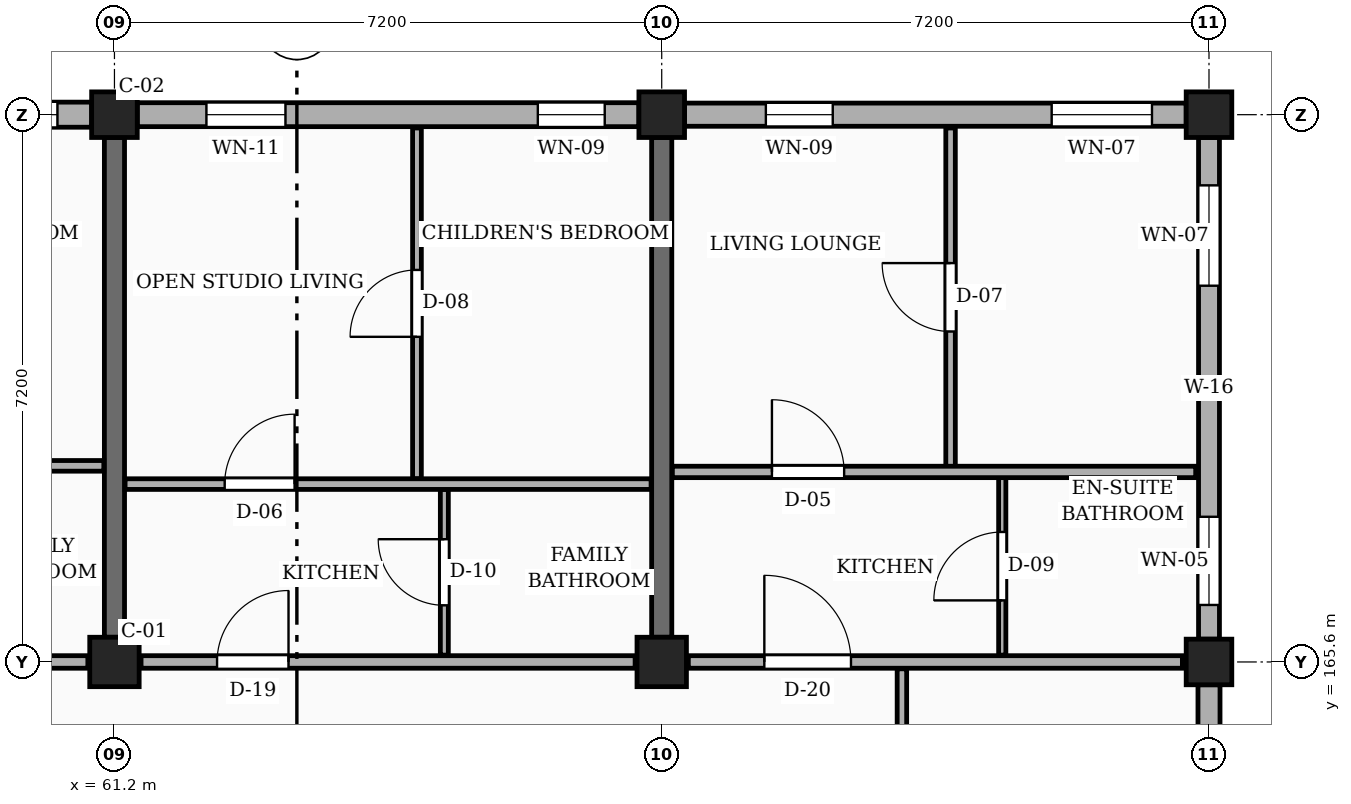
"""IFC4 building model, lengths in metres.
Left out: names, types, materials, properties, quantities, classifications, styles, units other than length and angle.
Written with IfcOpenShell. Run it as: python <this file> out.ifc"""

import sys

from ifc_helpers import new_model, si_unit, direction, frame, frame_2d, origin, origin_2d, place, context, subcontext, project, spatial, rectangle, extrude, element, fill, save


model = new_model("IFC4")
c1 = context("Model", 3, precision=1e-05, world=origin(), true_north=direction((0.0, 1.0)))
c2 = subcontext(c1, "Body", "Model", "MODEL_VIEW")
j1 = project(units=[si_unit("LENGTHUNIT", "METRE"), si_unit("PLANEANGLEUNIT", "RADIAN")], contexts=[c1])
p1 = place(None, origin())
s1 = spatial("IfcSite", under=j1, at=p1, CompositionType="ELEMENT")
p2 = place(p1, origin())
s2 = spatial("IfcBuilding", under=s1, at=p2, CompositionType="ELEMENT")
p3 = place(p2, frame((0.0, 0.0, 4.5)))
s3 = spatial("IfcBuildingStorey", under=s2, at=p3, CompositionType="ELEMENT", Elevation=4.5)
p4 = place(p3, frame((61.2, 165.6, 0.0), z_axis=(0.0, 0.0, 1.0), x_axis=(1.0, 0.0, 0.0)))
e1 = element("IfcColumn", 1, at=p4, inside=s3, PredefinedType="COLUMN", context=c2, shape_type="SweptSolid", body=[
    extrude(rectangle(XDim=0.65, YDim=0.65, at=origin_2d()), origin(), (0.0, 0.0, 1.0), 3.15),
])
p5 = place(p3, frame((61.2, 172.8, 0.0), z_axis=(0.0, 0.0, 1.0), x_axis=(1.0, 0.0, 0.0)))
e2 = element("IfcColumn", 2, at=p5, inside=s3, PredefinedType="COLUMN", context=c2, shape_type="SweptSolid", body=[
    extrude(rectangle(XDim=0.6, YDim=0.6, at=origin_2d()), origin(), (0.0, 0.0, 1.0), 3.15),
])
p6 = place(p3, frame((68.4, 165.6, 0.0), z_axis=(0.0, 0.0, 1.0), x_axis=(1.0, 0.0, 0.0)))
e3 = element("IfcColumn", 3, at=p6, inside=s3, PredefinedType="COLUMN", context=c2, shape_type="SweptSolid", body=[
    extrude(rectangle(XDim=0.65, YDim=0.65, at=origin_2d()), origin(), (0.0, 0.0, 1.0), 3.15),
])
for number, where, z_axis, x_axis in (
    (4, (68.4, 172.8, 0.0), (0.0, 0.0, 1.0), (1.0, 0.0, 0.0)),
    (5, (75.6, 165.6, 0.0), (0.0, 0.0, 1.0), (1.0, 0.0, 0.0)),
    (6, (75.6, 172.8, 0.0), (0.0, 0.0, 1.0), (1.0, 0.0, 0.0)),
):
    element("IfcColumn", number, at=place(p3, frame(where, z_axis=z_axis, x_axis=x_axis)), inside=s3, PredefinedType="COLUMN", context=c2, shape_type="SweptSolid", body=[
        extrude(rectangle(XDim=0.6, YDim=0.6, at=origin_2d()), origin(), (0.0, 0.0, 1.0), 3.15),
    ])
for number, where, z_axis, x_axis in (
    (7, (61.2, 165.925, 0.0), (0.0, 0.0, 1.0), (0.0, 1.0, 0.0)),
    (8, (68.4, 165.925, 0.0), (0.0, 0.0, 1.0), (0.0, 1.0, 0.0)),
):
    element("IfcWall", number, at=place(p3, frame(where, z_axis=z_axis, x_axis=x_axis)), inside=s3, PredefinedType="SOLIDWALL", context=c2, shape_type="SweptSolid", body=[
        extrude(rectangle(XDim=6.575, YDim=0.265, at=frame_2d((3.288, 0.0))), origin(), (0.0, 0.0, 1.0), 2.185),
    ])
p7 = place(p3, frame((75.6, 158.7, 0.0), z_axis=(0.0, 0.0, 1.0), x_axis=(0.0, 1.0, 0.0)))
e9 = element("IfcWall", 9, at=p7, inside=s3, PredefinedType="SOLIDWALL", context=c2, shape_type="SweptSolid", body=[
    extrude(rectangle(XDim=6.6, YDim=0.29, at=frame_2d((3.3, 0.0))), origin(), (0.0, 0.0, 1.0), 2.455),
])
p8 = place(p7, frame((0.45, 0.0, 0.78)))
e10 = element("IfcOpeningElement", 10, at=p8, cuts=e9, PredefinedType="OPENING", context=c2, shape_type="SweptSolid", body=[
    extrude(rectangle(XDim=1.0, YDim=1.15, at=frame_2d((0.5, 0.575))), frame((0.0, 0.155, 0.0), z_axis=(0.0, -1.0, 0.0), x_axis=(1.0, 0.0, 0.0)), (0.0, 0.0, 1.0), 0.31),
])
p9 = place(p7, frame((4.65, 0.0, 0.78)))
e11 = element("IfcOpeningElement", 11, at=p9, cuts=e9, PredefinedType="OPENING", context=c2, shape_type="SweptSolid", body=[
    extrude(rectangle(XDim=1.16, YDim=1.15, at=frame_2d((0.58, 0.575))), frame((0.0, 0.155, 0.0), z_axis=(0.0, -1.0, 0.0), x_axis=(1.0, 0.0, 0.0)), (0.0, 0.0, 1.0), 0.31),
])
p10 = place(p3, frame((75.6, 165.9, 0.0), z_axis=(0.0, 0.0, 1.0), x_axis=(0.0, 1.0, 0.0)))
e12 = element("IfcWall", 12, at=p10, inside=s3, PredefinedType="SOLIDWALL", context=c2, shape_type="SweptSolid", body=[
    extrude(rectangle(XDim=6.6, YDim=0.275, at=frame_2d((3.3, 0.0))), origin(), (0.0, 0.0, 1.0), 2.455),
])
p11 = place(p10, frame((0.45, 0.0, 0.78)))
e13 = element("IfcOpeningElement", 13, at=p11, cuts=e12, PredefinedType="OPENING", context=c2, shape_type="SweptSolid", body=[
    extrude(rectangle(XDim=1.16, YDim=1.15, at=frame_2d((0.58, 0.575))), frame((0.0, 0.147, 0.0), z_axis=(0.0, -1.0, 0.0), x_axis=(1.0, 0.0, 0.0)), (0.0, 0.0, 1.0), 0.295),
])
p12 = place(p10, frame((4.65, 0.0, 0.78)))
e14 = element("IfcOpeningElement", 14, at=p12, cuts=e12, PredefinedType="OPENING", context=c2, shape_type="SweptSolid", body=[
    extrude(rectangle(XDim=1.32, YDim=1.15, at=frame_2d((0.66, 0.575))), frame((0.0, 0.147, 0.0), z_axis=(0.0, -1.0, 0.0), x_axis=(1.0, 0.0, 0.0)), (0.0, 0.0, 1.0), 0.295),
])
p13 = place(p3, frame((75.3, 172.8, 0.0), z_axis=(0.0, 0.0, 1.0), x_axis=(-1.0, 0.0, 0.0)))
e15 = element("IfcWall", 15, at=p13, inside=s3, PredefinedType="SOLIDWALL", context=c2, shape_type="SweptSolid", body=[
    extrude(rectangle(XDim=6.6, YDim=0.305, at=frame_2d((3.3, 0.0))), origin(), (0.0, 0.0, 1.0), 2.455),
])
p14 = place(p13, frame((0.45, 0.0, 0.78)))
e16 = element("IfcOpeningElement", 16, at=p14, cuts=e15, PredefinedType="OPENING", context=c2, shape_type="SweptSolid", body=[
    extrude(rectangle(XDim=1.32, YDim=1.15, at=frame_2d((0.66, 0.575))), frame((0.0, 0.163, 0.0), z_axis=(0.0, -1.0, 0.0), x_axis=(1.0, 0.0, 0.0)), (0.0, 0.0, 1.0), 0.325),
])
p15 = place(p13, frame((4.65, 0.0, 0.78)))
e17 = element("IfcOpeningElement", 17, at=p15, cuts=e15, PredefinedType="OPENING", context=c2, shape_type="SweptSolid", body=[
    extrude(rectangle(XDim=0.88, YDim=1.26, at=frame_2d((0.44, 0.63))), frame((0.0, 0.163, 0.0), z_axis=(0.0, -1.0, 0.0), x_axis=(1.0, 0.0, 0.0)), (0.0, 0.0, 1.0), 0.325),
])
p16 = place(p3, frame((68.1, 172.8, 0.0), z_axis=(0.0, 0.0, 1.0), x_axis=(-1.0, 0.0, 0.0)))
e18 = element("IfcWall", 18, at=p16, inside=s3, PredefinedType="SOLIDWALL", context=c2, shape_type="SweptSolid", body=[
    extrude(rectangle(XDim=6.6, YDim=0.315, at=frame_2d((3.3, 0.0))), origin(), (0.0, 0.0, 1.0), 2.455),
])
p17 = place(p16, frame((0.45, 0.0, 0.78)))
e19 = element("IfcOpeningElement", 19, at=p17, cuts=e18, PredefinedType="OPENING", context=c2, shape_type="SweptSolid", body=[
    extrude(rectangle(XDim=0.88, YDim=1.26, at=frame_2d((0.44, 0.63))), frame((0.0, 0.167, 0.0), z_axis=(0.0, -1.0, 0.0), x_axis=(1.0, 0.0, 0.0)), (0.0, 0.0, 1.0), 0.335),
])
p18 = place(p16, frame((4.65, 0.0, 0.78)))
e20 = element("IfcOpeningElement", 20, at=p18, cuts=e18, PredefinedType="OPENING", context=c2, shape_type="SweptSolid", body=[
    extrude(rectangle(XDim=1.04, YDim=1.26, at=frame_2d((0.52, 0.63))), frame((0.0, 0.167, 0.0), z_axis=(0.0, -1.0, 0.0), x_axis=(1.0, 0.0, 0.0)), (0.0, 0.0, 1.0), 0.335),
])
p19 = place(p3, frame((60.9, 172.8, 0.0), z_axis=(0.0, 0.0, 1.0), x_axis=(-1.0, 0.0, 0.0)))
e21 = element("IfcWall", 21, at=p19, inside=s3, PredefinedType="SOLIDWALL", context=c2, shape_type="SweptSolid", body=[
    extrude(rectangle(XDim=6.6, YDim=0.33, at=frame_2d((3.3, 0.0))), origin(), (0.0, 0.0, 1.0), 2.455),
])
p20 = place(p19, frame((0.45, 0.0, 0.78)))
e22 = element("IfcOpeningElement", 22, at=p20, cuts=e21, PredefinedType="OPENING", context=c2, shape_type="SweptSolid", body=[
    extrude(rectangle(XDim=1.04, YDim=1.26, at=frame_2d((0.52, 0.63))), frame((0.0, 0.175, 0.0), z_axis=(0.0, -1.0, 0.0), x_axis=(1.0, 0.0, 0.0)), (0.0, 0.0, 1.0), 0.35),
])
p21 = place(p19, frame((4.65, 0.0, 0.78)))
e23 = element("IfcOpeningElement", 23, at=p21, cuts=e21, PredefinedType="OPENING", context=c2, shape_type="SweptSolid", body=[
    extrude(rectangle(XDim=1.2, YDim=1.26, at=frame_2d((0.6, 0.63))), frame((0.0, 0.175, 0.0), z_axis=(0.0, -1.0, 0.0), x_axis=(1.0, 0.0, 0.0)), (0.0, 0.0, 1.0), 0.35),
])
p22 = place(p3, frame((54.35, 165.6, 0.0), z_axis=(0.0, 0.0, 1.0), x_axis=(1.0, 0.0, 0.0)))
e24 = element("IfcWall", 24, at=p22, inside=s3, PredefinedType="PARTITIONING", context=c2, shape_type="SweptSolid", body=[
    extrude(rectangle(XDim=6.5, YDim=0.165, at=frame_2d((3.25, 0.0))), origin(), (0.0, 0.0, 1.0), 2.185),
])
p23 = place(p22, frame((1.0, 0.0, 0.0)))
e25 = element("IfcOpeningElement", 25, at=p23, cuts=e24, PredefinedType="OPENING", context=c2, shape_type="SweptSolid", body=[
    extrude(rectangle(XDim=1.0, YDim=2.15, at=frame_2d((0.5, 1.075))), frame((0.0, 0.093, 0.0), z_axis=(0.0, -1.0, 0.0), x_axis=(1.0, 0.0, 0.0)), (0.0, 0.0, 1.0), 0.185),
])
p24 = place(p3, frame((61.55, 165.6, 0.0), z_axis=(0.0, 0.0, 1.0), x_axis=(1.0, 0.0, 0.0)))
e26 = element("IfcWall", 26, at=p24, inside=s3, PredefinedType="PARTITIONING", context=c2, shape_type="SweptSolid", body=[
    extrude(rectangle(XDim=6.5, YDim=0.165, at=frame_2d((3.25, 0.0))), origin(), (0.0, 0.0, 1.0), 2.185),
])
p25 = place(p24, frame((1.0, 0.0, 0.0)))
e27 = element("IfcOpeningElement", 27, at=p25, cuts=e26, PredefinedType="OPENING", context=c2, shape_type="SweptSolid", body=[
    extrude(rectangle(XDim=0.94, YDim=2.12, at=frame_2d((0.47, 1.06))), frame((0.0, 0.093, 0.0), z_axis=(0.0, -1.0, 0.0), x_axis=(1.0, 0.0, 0.0)), (0.0, 0.0, 1.0), 0.185),
])
p26 = place(p3, frame((68.75, 165.6, 0.0), z_axis=(0.0, 0.0, 1.0), x_axis=(1.0, 0.0, 0.0)))
e28 = element("IfcWall", 28, at=p26, inside=s3, PredefinedType="PARTITIONING", context=c2, shape_type="SweptSolid", body=[
    extrude(rectangle(XDim=6.5, YDim=0.165, at=frame_2d((3.25, 0.0))), origin(), (0.0, 0.0, 1.0), 2.185),
])
p27 = place(p26, frame((1.0, 0.0, 0.0)))
e29 = element("IfcOpeningElement", 29, at=p27, cuts=e28, PredefinedType="OPENING", context=c2, shape_type="SweptSolid", body=[
    extrude(rectangle(XDim=1.14, YDim=2.18, at=frame_2d((0.57, 1.09))), frame((0.0, 0.093, 0.0), z_axis=(0.0, -1.0, 0.0), x_axis=(1.0, 0.0, 0.0)), (0.0, 0.0, 1.0), 0.185),
])
p28 = place(p3, frame((54.14, 168.18, 0.0), z_axis=(0.0, 0.0, 1.0), x_axis=(1.0, 0.0, 0.0)))
e30 = element("IfcWall", 30, at=p28, inside=s3, PredefinedType="PARTITIONING", context=c2, shape_type="SweptSolid", body=[
    extrude(rectangle(XDim=6.92, YDim=0.14, at=frame_2d((3.46, 0.0))), origin(), (0.0, 0.0, 1.0), 2.32),
])
p29 = place(p28, frame((1.31, 0.0, 0.0)))
e31 = element("IfcOpeningElement", 31, at=p29, cuts=e30, PredefinedType="OPENING", context=c2, shape_type="SweptSolid", body=[
    extrude(rectangle(XDim=0.95, YDim=2.1, at=frame_2d((0.475, 1.05))), frame((0.0, 0.08, 0.0), z_axis=(0.0, -1.0, 0.0), x_axis=(1.0, 0.0, 0.0)), (0.0, 0.0, 1.0), 0.16),
])
p30 = place(p3, frame((65.18, 168.01, 0.0), z_axis=(0.0, 0.0, 1.0), x_axis=(0.0, 1.0, 0.0)))
e32 = element("IfcWall", 32, at=p30, inside=s3, PredefinedType="PARTITIONING", context=c2, shape_type="SweptSolid", body=[
    extrude(rectangle(XDim=4.615, YDim=0.115, at=frame_2d((2.308, 0.0))), origin(), (0.0, 0.0, 1.0), 2.32),
])
p31 = place(p30, frame((1.867, 0.0, 0.0)))
e33 = element("IfcOpeningElement", 33, at=p31, cuts=e32, PredefinedType="OPENING", context=c2, shape_type="SweptSolid", body=[
    extrude(rectangle(XDim=0.88, YDim=2.08, at=frame_2d((0.44, 1.04))), frame((0.0, 0.067, 0.0), z_axis=(0.0, -1.0, 0.0), x_axis=(1.0, 0.0, 0.0)), (0.0, 0.0, 1.0), 0.135),
])
p32 = place(p3, frame((65.54, 165.69, 0.0), z_axis=(0.0, 0.0, 1.0), x_axis=(0.0, 1.0, 0.0)))
e34 = element("IfcWall", 34, at=p32, inside=s3, PredefinedType="PARTITIONING", context=c2, shape_type="SweptSolid", body=[
    extrude(rectangle(XDim=2.18, YDim=0.105, at=frame_2d((1.09, 0.0))), origin(), (0.0, 0.0, 1.0), 2.32),
])
p33 = place(p32, frame((0.655, 0.0, 0.0)))
e35 = element("IfcOpeningElement", 35, at=p33, cuts=e34, PredefinedType="OPENING", context=c2, shape_type="SweptSolid", body=[
    extrude(rectangle(XDim=0.87, YDim=2.05, at=frame_2d((0.435, 1.025))), frame((0.0, 0.062, 0.0), z_axis=(0.0, -1.0, 0.0), x_axis=(1.0, 0.0, 0.0)), (0.0, 0.0, 1.0), 0.125),
])
p34 = place(p3, frame((61.34, 167.94, 0.0), z_axis=(0.0, 0.0, 1.0), x_axis=(1.0, 0.0, 0.0)))
e36 = element("IfcWall", 36, at=p34, inside=s3, PredefinedType="PARTITIONING", context=c2, shape_type="SweptSolid", body=[
    extrude(rectangle(XDim=6.92, YDim=0.14, at=frame_2d((3.46, 0.0))), origin(), (0.0, 0.0, 1.0), 2.32),
])
p35 = place(p34, frame((1.31, 0.0, 0.0)))
e37 = element("IfcOpeningElement", 37, at=p35, cuts=e36, PredefinedType="OPENING", context=c2, shape_type="SweptSolid", body=[
    extrude(rectangle(XDim=0.92, YDim=2.1, at=frame_2d((0.46, 1.05))), frame((0.0, 0.08, 0.0), z_axis=(0.0, -1.0, 0.0), x_axis=(1.0, 0.0, 0.0)), (0.0, 0.0, 1.0), 0.16),
])
p36 = place(p3, frame((71.56, 158.49, 0.0), z_axis=(0.0, 0.0, 1.0), x_axis=(0.0, 1.0, 0.0)))
e38 = element("IfcWall", 38, at=p36, inside=s3, PredefinedType="PARTITIONING", context=c2, shape_type="SweptSolid", body=[
    extrude(rectangle(XDim=7.02, YDim=0.125, at=frame_2d((3.51, 0.0))), origin(), (0.0, 0.0, 1.0), 2.32),
])
p37 = place(p36, frame((2.85, 0.0, 0.0)))
e39 = element("IfcOpeningElement", 39, at=p37, cuts=e38, PredefinedType="OPENING", context=c2, shape_type="SweptSolid", body=[
    extrude(rectangle(XDim=1.02, YDim=2.15, at=frame_2d((0.51, 1.075))), frame((0.0, 0.073, 0.0), z_axis=(0.0, -1.0, 0.0), x_axis=(1.0, 0.0, 0.0)), (0.0, 0.0, 1.0), 0.145),
])
p38 = place(p3, frame((72.2, 168.17, 0.0), z_axis=(0.0, 0.0, 1.0), x_axis=(0.0, 1.0, 0.0)))
e40 = element("IfcWall", 40, at=p38, inside=s3, PredefinedType="PARTITIONING", context=c2, shape_type="SweptSolid", body=[
    extrude(rectangle(XDim=4.455, YDim=0.125, at=frame_2d((2.228, 0.0))), origin(), (0.0, 0.0, 1.0), 2.32),
])
p39 = place(p38, frame((1.778, 0.0, 0.0)))
e41 = element("IfcOpeningElement", 41, at=p39, cuts=e40, PredefinedType="OPENING", context=c2, shape_type="SweptSolid", body=[
    extrude(rectangle(XDim=0.9, YDim=2.1, at=frame_2d((0.45, 1.05))), frame((0.0, 0.073, 0.0), z_axis=(0.0, -1.0, 0.0), x_axis=(1.0, 0.0, 0.0)), (0.0, 0.0, 1.0), 0.145),
])
p40 = place(p3, frame((72.88, 165.69, 0.0), z_axis=(0.0, 0.0, 1.0), x_axis=(0.0, 1.0, 0.0)))
e42 = element("IfcWall", 42, at=p40, inside=s3, PredefinedType="PARTITIONING", context=c2, shape_type="SweptSolid", body=[
    extrude(rectangle(XDim=2.34, YDim=0.095, at=frame_2d((1.17, 0.0))), origin(), (0.0, 0.0, 1.0), 2.32),
])
p41 = place(p40, frame((0.72, 0.0, 0.0)))
e43 = element("IfcOpeningElement", 43, at=p41, cuts=e42, PredefinedType="OPENING", context=c2, shape_type="SweptSolid", body=[
    extrude(rectangle(XDim=0.9, YDim=2.05, at=frame_2d((0.45, 1.025))), frame((0.0, 0.058, 0.0), z_axis=(0.0, -1.0, 0.0), x_axis=(1.0, 0.0, 0.0)), (0.0, 0.0, 1.0), 0.115),
])
p42 = place(p3, frame((68.54, 168.1, 0.0), z_axis=(0.0, 0.0, 1.0), x_axis=(1.0, 0.0, 0.0)))
e44 = element("IfcWall", 44, at=p42, inside=s3, PredefinedType="PARTITIONING", context=c2, shape_type="SweptSolid", body=[
    extrude(rectangle(XDim=6.885, YDim=0.15, at=frame_2d((3.442, 0.0))), origin(), (0.0, 0.0, 1.0), 2.32),
])
p43 = place(p42, frame((1.31, 0.0, 0.0)))
e45 = element("IfcOpeningElement", 45, at=p43, cuts=e44, PredefinedType="OPENING", context=c2, shape_type="SweptSolid", body=[
    extrude(rectangle(XDim=0.95, YDim=2.1, at=frame_2d((0.475, 1.05))), frame((0.0, 0.085, 0.0), z_axis=(0.0, -1.0, 0.0), x_axis=(1.0, 0.0, 0.0)), (0.0, 0.0, 1.0), 0.17),
])
p44 = place(p11, origin())
e46 = element("IfcWindow", 46, at=p44, inside=s3, PartitioningType="SINGLE_PANEL", PredefinedType="WINDOW", context=c2, shape_type="SweptSolid", body=[
    extrude(rectangle(XDim=1.16, YDim=1.15, at=frame_2d((0.58, 0.575))), frame((0.0, 0.03, 0.0), z_axis=(0.0, -1.0, 0.0), x_axis=(1.0, 0.0, 0.0)), (0.0, 0.0, 1.0), 0.06),
])
fill(e13, e46)
p45 = place(p12, origin())
e47 = element("IfcWindow", 47, at=p45, inside=s3, PartitioningType="SINGLE_PANEL", PredefinedType="WINDOW", context=c2, shape_type="SweptSolid", body=[
    extrude(rectangle(XDim=1.32, YDim=1.15, at=frame_2d((0.66, 0.575))), frame((0.0, 0.03, 0.0), z_axis=(0.0, -1.0, 0.0), x_axis=(1.0, 0.0, 0.0)), (0.0, 0.0, 1.0), 0.06),
])
fill(e14, e47)
p46 = place(p14, origin())
e48 = element("IfcWindow", 48, at=p46, inside=s3, PartitioningType="SINGLE_PANEL", PredefinedType="WINDOW", context=c2, shape_type="SweptSolid", body=[
    extrude(rectangle(XDim=1.32, YDim=1.15, at=frame_2d((0.66, 0.575))), frame((0.0, 0.03, 0.0), z_axis=(0.0, -1.0, 0.0), x_axis=(1.0, 0.0, 0.0)), (0.0, 0.0, 1.0), 0.06),
])
fill(e16, e48)
p47 = place(p15, origin())
e49 = element("IfcWindow", 49, at=p47, inside=s3, PartitioningType="SINGLE_PANEL", PredefinedType="WINDOW", context=c2, shape_type="SweptSolid", body=[
    extrude(rectangle(XDim=0.88, YDim=1.26, at=frame_2d((0.44, 0.63))), frame((0.0, 0.03, 0.0), z_axis=(0.0, -1.0, 0.0), x_axis=(1.0, 0.0, 0.0)), (0.0, 0.0, 1.0), 0.06),
])
fill(e17, e49)
p48 = place(p17, origin())
e50 = element("IfcWindow", 50, at=p48, inside=s3, PartitioningType="SINGLE_PANEL", PredefinedType="WINDOW", context=c2, shape_type="SweptSolid", body=[
    extrude(rectangle(XDim=0.88, YDim=1.26, at=frame_2d((0.44, 0.63))), frame((0.0, 0.03, 0.0), z_axis=(0.0, -1.0, 0.0), x_axis=(1.0, 0.0, 0.0)), (0.0, 0.0, 1.0), 0.06),
])
fill(e19, e50)
p49 = place(p18, origin())
e51 = element("IfcWindow", 51, at=p49, inside=s3, PartitioningType="SINGLE_PANEL", PredefinedType="WINDOW", context=c2, shape_type="SweptSolid", body=[
    extrude(rectangle(XDim=1.04, YDim=1.26, at=frame_2d((0.52, 0.63))), frame((0.0, 0.03, 0.0), z_axis=(0.0, -1.0, 0.0), x_axis=(1.0, 0.0, 0.0)), (0.0, 0.0, 1.0), 0.06),
])
fill(e20, e51)
p50 = place(p20, origin())
e52 = element("IfcWindow", 52, at=p50, inside=s3, PartitioningType="SINGLE_PANEL", PredefinedType="WINDOW", context=c2, shape_type="SweptSolid", body=[
    extrude(rectangle(XDim=1.04, YDim=1.26, at=frame_2d((0.52, 0.63))), frame((0.0, 0.03, 0.0), z_axis=(0.0, -1.0, 0.0), x_axis=(1.0, 0.0, 0.0)), (0.0, 0.0, 1.0), 0.06),
])
fill(e22, e52)
p51 = place(p25, origin())
e53 = element("IfcDoor", 53, at=p51, inside=s3, OperationType="SINGLE_SWING_RIGHT", PredefinedType="DOOR", context=c2, shape_type="SweptSolid", body=[
    extrude(rectangle(XDim=0.94, YDim=2.12, at=frame_2d((0.47, 1.06))), frame((0.0, 0.025, 0.0), z_axis=(0.0, -1.0, 0.0), x_axis=(1.0, 0.0, 0.0)), (0.0, 0.0, 1.0), 0.05),
])
fill(e27, e53)
p52 = place(p27, origin())
e54 = element("IfcDoor", 54, at=p52, inside=s3, OperationType="SINGLE_SWING_LEFT", PredefinedType="DOOR", context=c2, shape_type="SweptSolid", body=[
    extrude(rectangle(XDim=1.14, YDim=2.18, at=frame_2d((0.57, 1.09))), frame((0.0, 0.025, 0.0), z_axis=(0.0, -1.0, 0.0), x_axis=(1.0, 0.0, 0.0)), (0.0, 0.0, 1.0), 0.05),
])
fill(e29, e54)
p53 = place(p31, origin())
e55 = element("IfcDoor", 55, at=p53, inside=s3, OperationType="SINGLE_SWING_LEFT", PredefinedType="DOOR", context=c2, shape_type="SweptSolid", body=[
    extrude(rectangle(XDim=0.88, YDim=2.08, at=frame_2d((0.44, 1.04))), frame((0.0, 0.025, 0.0), z_axis=(0.0, -1.0, 0.0), x_axis=(1.0, 0.0, 0.0)), (0.0, 0.0, 1.0), 0.05),
])
fill(e33, e55)
p54 = place(p33, origin())
e56 = element("IfcDoor", 56, at=p54, inside=s3, OperationType="SINGLE_SWING_RIGHT", PredefinedType="DOOR", context=c2, shape_type="SweptSolid", body=[
    extrude(rectangle(XDim=0.87, YDim=2.05, at=frame_2d((0.435, 1.025))), frame((0.0, 0.025, 0.0), z_axis=(0.0, -1.0, 0.0), x_axis=(1.0, 0.0, 0.0)), (0.0, 0.0, 1.0), 0.05),
])
fill(e35, e56)
p55 = place(p35, origin())
e57 = element("IfcDoor", 57, at=p55, inside=s3, OperationType="SINGLE_SWING_RIGHT", PredefinedType="DOOR", context=c2, shape_type="SweptSolid", body=[
    extrude(rectangle(XDim=0.92, YDim=2.1, at=frame_2d((0.46, 1.05))), frame((0.0, 0.025, 0.0), z_axis=(0.0, -1.0, 0.0), x_axis=(1.0, 0.0, 0.0)), (0.0, 0.0, 1.0), 0.05),
])
fill(e37, e57)
p56 = place(p39, origin())
e58 = element("IfcDoor", 58, at=p56, inside=s3, OperationType="SINGLE_SWING_RIGHT", PredefinedType="DOOR", context=c2, shape_type="SweptSolid", body=[
    extrude(rectangle(XDim=0.9, YDim=2.1, at=frame_2d((0.45, 1.05))), frame((0.0, 0.025, 0.0), z_axis=(0.0, -1.0, 0.0), x_axis=(1.0, 0.0, 0.0)), (0.0, 0.0, 1.0), 0.05),
])
fill(e41, e58)
p57 = place(p41, origin())
e59 = element("IfcDoor", 59, at=p57, inside=s3, OperationType="SINGLE_SWING_LEFT", PredefinedType="DOOR", context=c2, shape_type="SweptSolid", body=[
    extrude(rectangle(XDim=0.9, YDim=2.05, at=frame_2d((0.45, 1.025))), frame((0.0, 0.025, 0.0), z_axis=(0.0, -1.0, 0.0), x_axis=(1.0, 0.0, 0.0)), (0.0, 0.0, 1.0), 0.05),
])
fill(e43, e59)
p58 = place(p43, origin())
e60 = element("IfcDoor", 60, at=p58, inside=s3, OperationType="SINGLE_SWING_LEFT", PredefinedType="DOOR", context=c2, shape_type="SweptSolid", body=[
    extrude(rectangle(XDim=0.95, YDim=2.1, at=frame_2d((0.475, 1.05))), frame((0.0, 0.025, 0.0), z_axis=(0.0, -1.0, 0.0), x_axis=(1.0, 0.0, 0.0)), (0.0, 0.0, 1.0), 0.05),
])
fill(e45, e60)
save(model, sys.argv[1])
